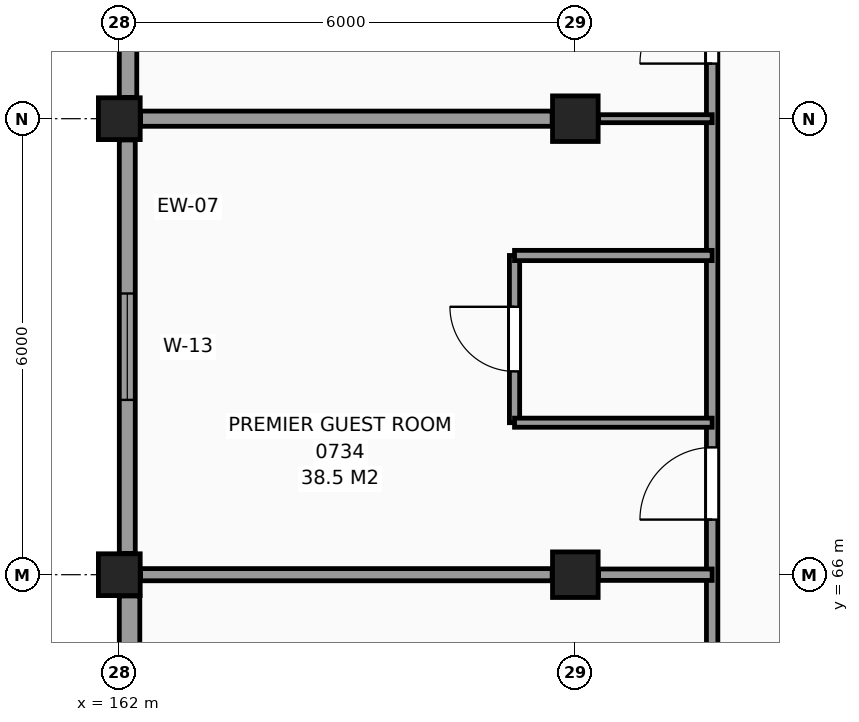
"""IFC4 building model, lengths in metres.
Left out: names, types, materials, properties, quantities, classifications, styles, units other than length and angle.
Written with IfcOpenShell. Run it as: python <this file> out.ifc"""

import sys

from ifc_helpers import new_model, si_unit, direction, frame, frame_2d, origin, origin_2d, place, context, subcontext, project, spatial, rectangle, extrude, element, fill, save


model = new_model("IFC4")
c1 = context("Model", 3, precision=1e-05, world=origin(), true_north=direction((0.0, 1.0)))
c2 = subcontext(c1, "Body", "Model", "MODEL_VIEW")
j1 = project(units=[si_unit("LENGTHUNIT", "METRE"), si_unit("PLANEANGLEUNIT", "RADIAN")], contexts=[c1])
p1 = place(None, origin())
s1 = spatial("IfcSite", under=j1, at=p1, CompositionType="ELEMENT")
p2 = place(p1, origin())
s2 = spatial("IfcBuilding", under=s1, at=p2, CompositionType="ELEMENT")
p3 = place(p2, frame((0.0, 0.0, 31.5)))
s3 = spatial("IfcBuildingStorey", under=s2, at=p3, CompositionType="ELEMENT", Elevation=31.5)
for number, where, z_axis, x_axis in (
    (1, (162.0, 66.0, 0.0), (0.0, 0.0, 1.0), (1.0, 0.0, 0.0)),
    (2, (162.0, 72.0, 0.0), (0.0, 0.0, 1.0), (1.0, 0.0, 0.0)),
):
    element("IfcColumn", number, at=place(p3, frame(where, z_axis=z_axis, x_axis=x_axis)), inside=s3, PredefinedType="COLUMN", context=c2, shape_type="SweptSolid", body=[
        extrude(rectangle(XDim=0.55, YDim=0.55, at=origin_2d()), origin(), (0.0, 0.0, 1.0), 3.3),
    ])
for number, where, z_axis, x_axis in (
    (3, (168.0, 66.0, 0.0), (0.0, 0.0, 1.0), (1.0, 0.0, 0.0)),
    (4, (168.0, 72.0, 0.0), (0.0, 0.0, 1.0), (1.0, 0.0, 0.0)),
):
    element("IfcColumn", number, at=place(p3, frame(where, z_axis=z_axis, x_axis=x_axis)), inside=s3, PredefinedType="COLUMN", context=c2, shape_type="SweptSolid", body=[
        extrude(rectangle(XDim=0.6, YDim=0.6, at=origin_2d()), origin(), (0.0, 0.0, 1.0), 3.3),
    ])
p4 = place(p3, frame((162.115, 77.72, 0.0), z_axis=(0.0, 0.0, 1.0), x_axis=(0.0, -1.0, 0.0)))
e5 = element("IfcWall", 5, at=p4, inside=s3, PredefinedType="SOLIDWALL", context=c2, shape_type="SweptSolid", body=[
    extrude(rectangle(XDim=5.44, YDim=0.23, at=frame_2d((2.72, 0.0))), origin(), (0.0, 0.0, 1.0), 2.42),
])
p5 = place(p4, frame((2.02, 0.0, 0.8)))
e6 = element("IfcOpeningElement", 6, at=p5, cuts=e5, PredefinedType="OPENING", context=c2, shape_type="SweptSolid", body=[
    extrude(rectangle(XDim=1.4, YDim=1.4, at=frame_2d((0.7, 0.7))), frame((0.0, 0.125, 0.0), z_axis=(0.0, -1.0, 0.0), x_axis=(1.0, 0.0, 0.0)), (0.0, 0.0, 1.0), 0.25),
])
p6 = place(p3, frame((162.105, 71.72, 0.0), z_axis=(0.0, 0.0, 1.0), x_axis=(0.0, -1.0, 0.0)))
e7 = element("IfcWall", 7, at=p6, inside=s3, PredefinedType="SOLIDWALL", context=c2, shape_type="SweptSolid", body=[
    extrude(rectangle(XDim=5.44, YDim=0.21, at=frame_2d((2.72, 0.0))), origin(), (0.0, 0.0, 1.0), 2.42),
])
p7 = place(p6, frame((2.02, 0.0, 0.8)))
e8 = element("IfcOpeningElement", 8, at=p7, cuts=e7, PredefinedType="OPENING", context=c2, shape_type="SweptSolid", body=[
    extrude(rectangle(XDim=1.4, YDim=1.4, at=frame_2d((0.7, 0.7))), frame((0.0, 0.115, 0.0), z_axis=(0.0, -1.0, 0.0), x_axis=(1.0, 0.0, 0.0)), (0.0, 0.0, 1.0), 0.23),
])
p8 = place(p3, frame((162.135, 65.72, 0.0), z_axis=(0.0, 0.0, 1.0), x_axis=(0.0, -1.0, 0.0)))
e9 = element("IfcWall", 9, at=p8, inside=s3, PredefinedType="SOLIDWALL", context=c2, shape_type="SweptSolid", body=[
    extrude(rectangle(XDim=5.44, YDim=0.27, at=frame_2d((2.72, 0.0))), origin(), (0.0, 0.0, 1.0), 2.42),
])
p9 = place(p8, frame((2.02, 0.0, 0.8)))
e10 = element("IfcOpeningElement", 10, at=p9, cuts=e9, PredefinedType="OPENING", context=c2, shape_type="SweptSolid", body=[
    extrude(rectangle(XDim=1.4, YDim=1.4, at=frame_2d((0.7, 0.7))), frame((0.0, 0.145, 0.0), z_axis=(0.0, -1.0, 0.0), x_axis=(1.0, 0.0, 0.0)), (0.0, 0.0, 1.0), 0.29),
])
p10 = place(p3, frame((167.2, 68.0, 0.0), z_axis=(0.0, 0.0, 1.0), x_axis=(0.0, 1.0, 0.0)))
e11 = element("IfcWall", 11, at=p10, inside=s3, PredefinedType="PARTITIONING", context=c2, shape_type="SweptSolid", body=[
    extrude(rectangle(XDim=2.2, YDim=0.135, at=frame_2d((1.1, 0.0))), origin(), (0.0, 0.0, 1.0), 3.07),
])
p11 = place(p10, frame((0.675, 0.0, 0.0)))
e12 = element("IfcOpeningElement", 12, at=p11, cuts=e11, PredefinedType="OPENING", context=c2, shape_type="SweptSolid", body=[
    extrude(rectangle(XDim=0.85, YDim=2.1, at=frame_2d((0.425, 1.05))), frame((0.0, 0.078, 0.0), z_axis=(0.0, -1.0, 0.0), x_axis=(1.0, 0.0, 0.0)), (0.0, 0.0, 1.0), 0.155),
])
p12 = place(p3, frame((169.8, 42.255, 0.0), z_axis=(0.0, 0.0, 1.0), x_axis=(0.0, 1.0, 0.0)))
e13 = element("IfcWall", 13, at=p12, inside=s3, PredefinedType="PARTITIONING", context=c2, shape_type="SweptSolid", body=[
    extrude(rectangle(XDim=65.565, YDim=0.15, at=frame_2d((32.783, 0.0))), origin(), (0.0, 0.0, 1.0), 3.07),
])
p13 = place(p12, frame((50.145, 0.0, 0.0)))
e14 = element("IfcOpeningElement", 14, at=p13, cuts=e13, PredefinedType="OPENING", context=c2, shape_type="SweptSolid", body=[
    extrude(rectangle(XDim=1.2, YDim=2.2, at=frame_2d((0.6, 1.1))), frame((0.0, 0.085, 0.0), z_axis=(0.0, -1.0, 0.0), x_axis=(1.0, 0.0, 0.0)), (0.0, 0.0, 1.0), 0.17),
])
p14 = place(p12, frame((0.42, 0.0, 0.0)))
e15 = element("IfcOpeningElement", 15, at=p14, cuts=e13, PredefinedType="OPENING", context=c2, shape_type="SweptSolid", body=[
    extrude(rectangle(XDim=0.95, YDim=2.1, at=frame_2d((0.475, 1.05))), frame((0.0, 0.085, 0.0), z_axis=(0.0, -1.0, 0.0), x_axis=(1.0, 0.0, 0.0)), (0.0, 0.0, 1.0), 0.17),
])
p15 = place(p12, frame((6.47, 0.0, 0.0)))
e16 = element("IfcOpeningElement", 16, at=p15, cuts=e13, PredefinedType="OPENING", context=c2, shape_type="SweptSolid", body=[
    extrude(rectangle(XDim=0.95, YDim=2.1, at=frame_2d((0.475, 1.05))), frame((0.0, 0.085, 0.0), z_axis=(0.0, -1.0, 0.0), x_axis=(1.0, 0.0, 0.0)), (0.0, 0.0, 1.0), 0.17),
])
p16 = place(p12, frame((12.47, 0.0, 0.0)))
e17 = element("IfcOpeningElement", 17, at=p16, cuts=e13, PredefinedType="OPENING", context=c2, shape_type="SweptSolid", body=[
    extrude(rectangle(XDim=0.95, YDim=2.1, at=frame_2d((0.475, 1.05))), frame((0.0, 0.085, 0.0), z_axis=(0.0, -1.0, 0.0), x_axis=(1.0, 0.0, 0.0)), (0.0, 0.0, 1.0), 0.17),
])
p17 = place(p12, frame((18.47, 0.0, 0.0)))
e18 = element("IfcOpeningElement", 18, at=p17, cuts=e13, PredefinedType="OPENING", context=c2, shape_type="SweptSolid", body=[
    extrude(rectangle(XDim=0.95, YDim=2.1, at=frame_2d((0.475, 1.05))), frame((0.0, 0.085, 0.0), z_axis=(0.0, -1.0, 0.0), x_axis=(1.0, 0.0, 0.0)), (0.0, 0.0, 1.0), 0.17),
])
p18 = place(p12, frame((24.47, 0.0, 0.0)))
e19 = element("IfcOpeningElement", 19, at=p18, cuts=e13, PredefinedType="OPENING", context=c2, shape_type="SweptSolid", body=[
    extrude(rectangle(XDim=0.95, YDim=2.1, at=frame_2d((0.475, 1.05))), frame((0.0, 0.085, 0.0), z_axis=(0.0, -1.0, 0.0), x_axis=(1.0, 0.0, 0.0)), (0.0, 0.0, 1.0), 0.17),
])
p19 = place(p12, frame((30.47, 0.0, 0.0)))
e20 = element("IfcOpeningElement", 20, at=p19, cuts=e13, PredefinedType="OPENING", context=c2, shape_type="SweptSolid", body=[
    extrude(rectangle(XDim=0.95, YDim=2.1, at=frame_2d((0.475, 1.05))), frame((0.0, 0.085, 0.0), z_axis=(0.0, -1.0, 0.0), x_axis=(1.0, 0.0, 0.0)), (0.0, 0.0, 1.0), 0.17),
])
p20 = place(p12, frame((54.47, 0.0, 0.0)))
e21 = element("IfcOpeningElement", 21, at=p20, cuts=e13, PredefinedType="OPENING", context=c2, shape_type="SweptSolid", body=[
    extrude(rectangle(XDim=0.95, YDim=2.1, at=frame_2d((0.475, 1.05))), frame((0.0, 0.085, 0.0), z_axis=(0.0, -1.0, 0.0), x_axis=(1.0, 0.0, 0.0)), (0.0, 0.0, 1.0), 0.17),
])
p21 = place(p12, frame((60.47, 0.0, 0.0)))
e22 = element("IfcOpeningElement", 22, at=p21, cuts=e13, PredefinedType="OPENING", context=c2, shape_type="SweptSolid", body=[
    extrude(rectangle(XDim=0.95, YDim=2.1, at=frame_2d((0.475, 1.05))), frame((0.0, 0.085, 0.0), z_axis=(0.0, -1.0, 0.0), x_axis=(1.0, 0.0, 0.0)), (0.0, 0.0, 1.0), 0.17),
])
p22 = place(p3, frame((162.28, 66.0, 0.0), z_axis=(0.0, 0.0, 1.0), x_axis=(1.0, 0.0, 0.0)))
e23 = element("IfcWall", 23, at=p22, inside=s3, PredefinedType="PARTITIONING", context=c2, shape_type="SweptSolid", body=[
    extrude(rectangle(XDim=5.415, YDim=0.16, at=frame_2d((2.708, 0.0))), origin(), (0.0, 0.0, 1.0), 2.27),
])
p23 = place(p3, frame((168.305, 66.0, 0.0), z_axis=(0.0, 0.0, 1.0), x_axis=(1.0, 0.0, 0.0)))
e24 = element("IfcWall", 24, at=p23, inside=s3, PredefinedType="PARTITIONING", context=c2, shape_type="SweptSolid", body=[
    extrude(rectangle(XDim=1.495, YDim=0.15, at=frame_2d((0.748, 0.0))), origin(), (0.0, 0.0, 1.0), 2.27),
])
p24 = place(p3, frame((167.2, 68.0, 0.0), z_axis=(0.0, 0.0, 1.0), x_axis=(1.0, 0.0, 0.0)))
e25 = element("IfcWall", 25, at=p24, inside=s3, PredefinedType="PARTITIONING", context=c2, shape_type="SweptSolid", body=[
    extrude(rectangle(XDim=2.6, YDim=0.12, at=frame_2d((1.3, 0.0))), origin(), (0.0, 0.0, 1.0), 3.07),
])
p25 = place(p3, frame((167.2, 70.2, 0.0), z_axis=(0.0, 0.0, 1.0), x_axis=(1.0, 0.0, 0.0)))
e26 = element("IfcWall", 26, at=p25, inside=s3, PredefinedType="PARTITIONING", context=c2, shape_type="SweptSolid", body=[
    extrude(rectangle(XDim=2.6, YDim=0.135, at=frame_2d((1.3, 0.0))), origin(), (0.0, 0.0, 1.0), 3.07),
])
p26 = place(p3, frame((162.28, 72.0, 0.0), z_axis=(0.0, 0.0, 1.0), x_axis=(1.0, 0.0, 0.0)))
e27 = element("IfcWall", 27, at=p26, inside=s3, PredefinedType="PARTITIONING", context=c2, shape_type="SweptSolid", body=[
    extrude(rectangle(XDim=5.415, YDim=0.2, at=frame_2d((2.708, 0.0))), origin(), (0.0, 0.0, 1.0), 2.27),
])
p27 = place(p3, frame((168.305, 72.0, 0.0), z_axis=(0.0, 0.0, 1.0), x_axis=(1.0, 0.0, 0.0)))
e28 = element("IfcWall", 28, at=p27, inside=s3, PredefinedType="PARTITIONING", context=c2, shape_type="SweptSolid", body=[
    extrude(rectangle(XDim=1.495, YDim=0.105, at=frame_2d((0.748, 0.0))), origin(), (0.0, 0.0, 1.0), 2.27),
])
p28 = place(p7, origin())
e29 = element("IfcWindow", 29, at=p28, inside=s3, PartitioningType="SINGLE_PANEL", PredefinedType="WINDOW", context=c2, shape_type="SweptSolid", body=[
    extrude(rectangle(XDim=1.4, YDim=1.4, at=frame_2d((0.7, 0.7))), frame((0.0, 0.03, 0.0), z_axis=(0.0, -1.0, 0.0), x_axis=(1.0, 0.0, 0.0)), (0.0, 0.0, 1.0), 0.06),
])
fill(e8, e29)
p29 = place(p11, origin())
e30 = element("IfcDoor", 30, at=p29, inside=s3, OperationType="SINGLE_SWING_RIGHT", PredefinedType="DOOR", context=c2, shape_type="SweptSolid", body=[
    extrude(rectangle(XDim=0.85, YDim=2.1, at=frame_2d((0.425, 1.05))), frame((0.0, 0.025, 0.0), z_axis=(0.0, -1.0, 0.0), x_axis=(1.0, 0.0, 0.0)), (0.0, 0.0, 1.0), 0.05),
])
fill(e12, e30)
p30 = place(p18, origin())
e31 = element("IfcDoor", 31, at=p30, inside=s3, OperationType="SINGLE_SWING_LEFT", PredefinedType="DOOR", context=c2, shape_type="SweptSolid", body=[
    extrude(rectangle(XDim=0.95, YDim=2.1, at=frame_2d((0.475, 1.05))), frame((0.0, 0.025, 0.0), z_axis=(0.0, -1.0, 0.0), x_axis=(1.0, 0.0, 0.0)), (0.0, 0.0, 1.0), 0.05),
])
fill(e19, e31)
p31 = place(p19, origin())
e32 = element("IfcDoor", 32, at=p31, inside=s3, OperationType="SINGLE_SWING_LEFT", PredefinedType="DOOR", context=c2, shape_type="SweptSolid", body=[
    extrude(rectangle(XDim=0.95, YDim=2.1, at=frame_2d((0.475, 1.05))), frame((0.0, 0.025, 0.0), z_axis=(0.0, -1.0, 0.0), x_axis=(1.0, 0.0, 0.0)), (0.0, 0.0, 1.0), 0.05),
])
fill(e20, e32)
save(model, sys.argv[1])
